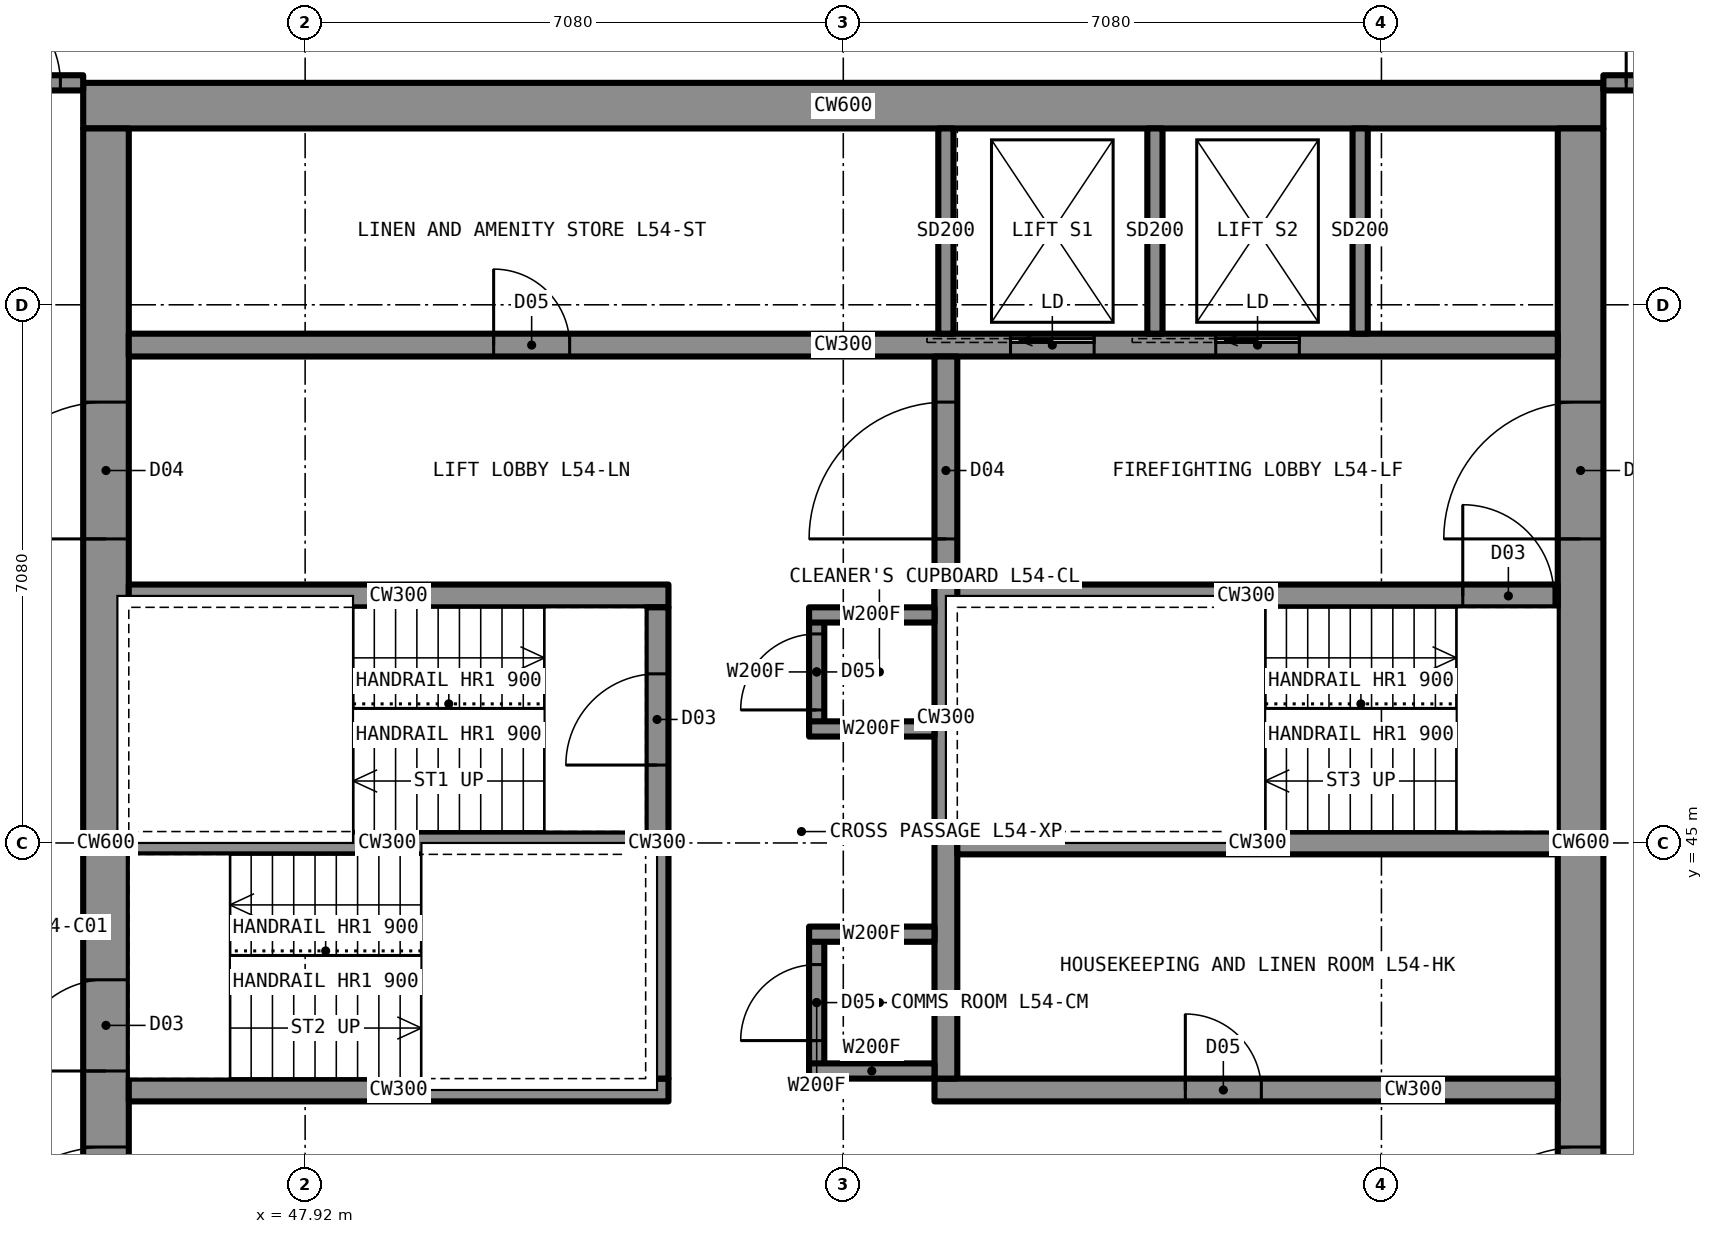
"""IFC4 building model, lengths in metres.
Left out: names, types, materials, properties, quantities, classifications, styles, units other than length and angle.
Written with IfcOpenShell. Run it as: python <this file> out.ifc"""

import sys

from ifc_helpers import new_model, si_unit, direction, frame, frame_2d, origin, place, context, subcontext, project, spatial, rectangle, extrude, element, fill, save


model = new_model("IFC4")
c1 = context("Model", 3, precision=1e-05, world=origin(), true_north=direction((0.0, 1.0)))
c2 = subcontext(c1, "Body", "Model", "MODEL_VIEW")
j1 = project(units=[si_unit("LENGTHUNIT", "METRE"), si_unit("PLANEANGLEUNIT", "RADIAN")], contexts=[c1])
p1 = place(None, origin())
s1 = spatial("IfcSite", under=j1, at=p1, CompositionType="ELEMENT")
p2 = place(p1, origin())
s2 = spatial("IfcBuilding", under=s1, at=p2, CompositionType="ELEMENT")
p3 = place(p2, frame((0.0, 0.0, 193.3)))
s3 = spatial("IfcBuildingStorey", under=s2, at=p3, CompositionType="ELEMENT", Elevation=193.3)
p4 = place(p3, frame((45.0, 54.7, 0.0), z_axis=(0.0, 0.0, 1.0), x_axis=(1.0, 0.0, 0.0)))
e1 = element("IfcWall", 1, at=p4, inside=s3, PredefinedType="SHEAR", context=c2, shape_type="SweptSolid", body=[
    extrude(rectangle(XDim=20.0, YDim=0.6, at=frame_2d((10.0, 0.0))), origin(), (0.0, 0.0, 1.0), 3.5),
])
p5 = place(p3, frame((64.7, 35.6, 0.0), z_axis=(0.0, 0.0, 1.0), x_axis=(0.0, 1.0, 0.0)))
e2 = element("IfcWall", 2, at=p5, inside=s3, PredefinedType="SHEAR", context=c2, shape_type="SweptSolid", body=[
    extrude(rectangle(XDim=18.8, YDim=0.6, at=frame_2d((9.4, 0.0))), origin(), (0.0, 0.0, 1.0), 3.5),
])
p6 = place(p5, frame((13.4, 0.0, 0.0)))
e3 = element("IfcOpeningElement", 3, at=p6, cuts=e2, PredefinedType="OPENING", context=c2, shape_type="SweptSolid", body=[
    extrude(rectangle(XDim=1.8, YDim=2.2, at=frame_2d((0.9, 1.1))), frame((0.0, 0.31, 0.0), z_axis=(0.0, -1.0, 0.0), x_axis=(1.0, 0.0, 0.0)), (0.0, 0.0, 1.0), 0.62),
])
p7 = place(p5, frame((3.6, 0.0, 0.0)))
e4 = element("IfcOpeningElement", 4, at=p7, cuts=e2, PredefinedType="OPENING", context=c2, shape_type="SweptSolid", body=[
    extrude(rectangle(XDim=1.8, YDim=2.2, at=frame_2d((0.9, 1.1))), frame((0.0, 0.31, 0.0), z_axis=(0.0, -1.0, 0.0), x_axis=(1.0, 0.0, 0.0)), (0.0, 0.0, 1.0), 0.62),
])
p8 = place(p3, frame((45.3, 35.6, 0.0), z_axis=(0.0, 0.0, 1.0), x_axis=(0.0, 1.0, 0.0)))
e5 = element("IfcWall", 5, at=p8, inside=s3, PredefinedType="SHEAR", context=c2, shape_type="SweptSolid", body=[
    extrude(rectangle(XDim=18.8, YDim=0.6, at=frame_2d((9.4, 0.0))), origin(), (0.0, 0.0, 1.0), 3.5),
])
p9 = place(p8, frame((13.4, 0.0, 0.0)))
e6 = element("IfcOpeningElement", 6, at=p9, cuts=e5, PredefinedType="OPENING", context=c2, shape_type="SweptSolid", body=[
    extrude(rectangle(XDim=1.8, YDim=2.2, at=frame_2d((0.9, 1.1))), frame((0.0, 0.31, 0.0), z_axis=(0.0, -1.0, 0.0), x_axis=(1.0, 0.0, 0.0)), (0.0, 0.0, 1.0), 0.62),
])
p10 = place(p8, frame((3.6, 0.0, 0.0)))
e7 = element("IfcOpeningElement", 7, at=p10, cuts=e5, PredefinedType="OPENING", context=c2, shape_type="SweptSolid", body=[
    extrude(rectangle(XDim=1.8, YDim=2.2, at=frame_2d((0.9, 1.1))), frame((0.0, 0.31, 0.0), z_axis=(0.0, -1.0, 0.0), x_axis=(1.0, 0.0, 0.0)), (0.0, 0.0, 1.0), 0.62),
])
p11 = place(p8, frame((6.4, 0.0, 0.0)))
e8 = element("IfcOpeningElement", 8, at=p11, cuts=e5, PredefinedType="OPENING", context=c2, shape_type="SweptSolid", body=[
    extrude(rectangle(XDim=1.2, YDim=2.2, at=frame_2d((0.6, 1.1))), frame((0.0, 0.31, 0.0), z_axis=(0.0, -1.0, 0.0), x_axis=(1.0, 0.0, 0.0)), (0.0, 0.0, 1.0), 0.62),
])
p12 = place(p3, frame((45.6, 51.55, 0.0), z_axis=(0.0, 0.0, 1.0), x_axis=(1.0, 0.0, 0.0)))
e9 = element("IfcWall", 9, at=p12, inside=s3, PredefinedType="SHEAR", context=c2, shape_type="SweptSolid", body=[
    extrude(rectangle(XDim=18.8, YDim=0.3, at=frame_2d((9.4, 0.0))), origin(), (0.0, 0.0, 1.0), 3.5),
])
p13 = place(p12, frame((4.8, 0.0, 0.0)))
e10 = element("IfcOpeningElement", 10, at=p13, cuts=e9, PredefinedType="OPENING", context=c2, shape_type="SweptSolid", body=[
    extrude(rectangle(XDim=1.0, YDim=2.1, at=frame_2d((0.5, 1.05))), frame((0.0, 0.16, 0.0), z_axis=(0.0, -1.0, 0.0), x_axis=(1.0, 0.0, 0.0)), (0.0, 0.0, 1.0), 0.32),
])
p14 = place(p12, frame((11.6, 0.0, 0.0)))
e11 = element("IfcOpeningElement", 11, at=p14, cuts=e9, PredefinedType="OPENING", context=c2, shape_type="SweptSolid", body=[
    extrude(rectangle(XDim=1.1, YDim=2.2, at=frame_2d((0.55, 1.1))), frame((0.0, 0.16, 0.0), z_axis=(0.0, -1.0, 0.0), x_axis=(1.0, 0.0, 0.0)), (0.0, 0.0, 1.0), 0.32),
])
p15 = place(p12, frame((14.3, 0.0, 0.0)))
e12 = element("IfcOpeningElement", 12, at=p15, cuts=e9, PredefinedType="OPENING", context=c2, shape_type="SweptSolid", body=[
    extrude(rectangle(XDim=1.1, YDim=2.2, at=frame_2d((0.55, 1.1))), frame((0.0, 0.16, 0.0), z_axis=(0.0, -1.0, 0.0), x_axis=(1.0, 0.0, 0.0)), (0.0, 0.0, 1.0), 0.32),
])
p16 = place(p3, frame((45.6, 48.25, 0.0), z_axis=(0.0, 0.0, 1.0), x_axis=(1.0, 0.0, 0.0)))
e13 = element("IfcWall", 13, at=p16, inside=s3, PredefinedType="SHEAR", context=c2, shape_type="SweptSolid", body=[
    extrude(rectangle(XDim=7.1, YDim=0.3, at=frame_2d((3.55, 0.0))), origin(), (0.0, 0.0, 1.0), 3.5),
])
p17 = place(p3, frame((56.2, 48.25, 0.0), z_axis=(0.0, 0.0, 1.0), x_axis=(1.0, 0.0, 0.0)))
e14 = element("IfcWall", 14, at=p17, inside=s3, PredefinedType="SHEAR", context=c2, shape_type="SweptSolid", body=[
    extrude(rectangle(XDim=8.2, YDim=0.3, at=frame_2d((4.1, 0.0))), origin(), (0.0, 0.0, 1.0), 3.5),
])
p18 = place(p17, frame((6.95, 0.0, 0.0)))
e15 = element("IfcOpeningElement", 15, at=p18, cuts=e14, PredefinedType="OPENING", context=c2, shape_type="SweptSolid", body=[
    extrude(rectangle(XDim=1.2, YDim=2.2, at=frame_2d((0.6, 1.1))), frame((0.0, 0.16, 0.0), z_axis=(0.0, -1.0, 0.0), x_axis=(1.0, 0.0, 0.0)), (0.0, 0.0, 1.0), 0.32),
])
p19 = place(p3, frame((45.6, 41.75, 0.0), z_axis=(0.0, 0.0, 1.0), x_axis=(1.0, 0.0, 0.0)))
e16 = element("IfcWall", 16, at=p19, inside=s3, PredefinedType="SHEAR", context=c2, shape_type="SweptSolid", body=[
    extrude(rectangle(XDim=7.1, YDim=0.3, at=frame_2d((3.55, 0.0))), origin(), (0.0, 0.0, 1.0), 3.5),
])
p20 = place(p3, frame((56.2, 41.75, 0.0), z_axis=(0.0, 0.0, 1.0), x_axis=(1.0, 0.0, 0.0)))
e17 = element("IfcWall", 17, at=p20, inside=s3, PredefinedType="SHEAR", context=c2, shape_type="SweptSolid", body=[
    extrude(rectangle(XDim=8.2, YDim=0.3, at=frame_2d((4.1, 0.0))), origin(), (0.0, 0.0, 1.0), 3.5),
])
p21 = place(p20, frame((3.3, 0.0, 0.0)))
e18 = element("IfcOpeningElement", 18, at=p21, cuts=e17, PredefinedType="OPENING", context=c2, shape_type="SweptSolid", body=[
    extrude(rectangle(XDim=1.0, YDim=2.1, at=frame_2d((0.5, 1.05))), frame((0.0, 0.16, 0.0), z_axis=(0.0, -1.0, 0.0), x_axis=(1.0, 0.0, 0.0)), (0.0, 0.0, 1.0), 0.32),
])
p22 = place(p3, frame((52.55, 41.9, 0.0), z_axis=(0.0, 0.0, 1.0), x_axis=(0.0, 1.0, 0.0)))
e19 = element("IfcWall", 19, at=p22, inside=s3, PredefinedType="SHEAR", context=c2, shape_type="SweptSolid", body=[
    extrude(rectangle(XDim=6.2, YDim=0.3, at=frame_2d((3.1, 0.0))), origin(), (0.0, 0.0, 1.0), 3.5),
])
p23 = place(p22, frame((4.125, 0.0, 0.0)))
e20 = element("IfcOpeningElement", 20, at=p23, cuts=e19, PredefinedType="OPENING", context=c2, shape_type="SweptSolid", body=[
    extrude(rectangle(XDim=1.2, YDim=2.2, at=frame_2d((0.6, 1.1))), frame((0.0, 0.16, 0.0), z_axis=(0.0, -1.0, 0.0), x_axis=(1.0, 0.0, 0.0)), (0.0, 0.0, 1.0), 0.32),
])
p24 = place(p3, frame((56.35, 41.9, 0.0), z_axis=(0.0, 0.0, 1.0), x_axis=(0.0, 1.0, 0.0)))
e21 = element("IfcWall", 21, at=p24, inside=s3, PredefinedType="SHEAR", context=c2, shape_type="SweptSolid", body=[
    extrude(rectangle(XDim=9.5, YDim=0.3, at=frame_2d((4.75, 0.0))), origin(), (0.0, 0.0, 1.0), 3.5),
])
p25 = place(p24, frame((7.1, 0.0, 0.0)))
e22 = element("IfcOpeningElement", 22, at=p25, cuts=e21, PredefinedType="OPENING", context=c2, shape_type="SweptSolid", body=[
    extrude(rectangle(XDim=1.8, YDim=2.2, at=frame_2d((0.9, 1.1))), frame((0.0, 0.16, 0.0), z_axis=(0.0, -1.0, 0.0), x_axis=(1.0, 0.0, 0.0)), (0.0, 0.0, 1.0), 0.32),
])
p26 = place(p3, frame((45.6, 45.0, 0.0), z_axis=(0.0, 0.0, 1.0), x_axis=(1.0, 0.0, 0.0)))
e23 = element("IfcWall", 23, at=p26, inside=s3, PredefinedType="SHEAR", context=c2, shape_type="SweptSolid", body=[
    extrude(rectangle(XDim=6.8, YDim=0.3, at=frame_2d((3.4, 0.0))), origin(), (0.0, 0.0, 1.0), 3.5),
])
p27 = place(p3, frame((56.5, 45.0, 0.0), z_axis=(0.0, 0.0, 1.0), x_axis=(1.0, 0.0, 0.0)))
e24 = element("IfcWall", 24, at=p27, inside=s3, PredefinedType="SHEAR", context=c2, shape_type="SweptSolid", body=[
    extrude(rectangle(XDim=7.9, YDim=0.3, at=frame_2d((3.95, 0.0))), origin(), (0.0, 0.0, 1.0), 3.5),
])
p28 = place(p3, frame((43.2, 55.0, 0.0), z_axis=(0.0, 0.0, 1.0), x_axis=(1.0, 0.0, 0.0)))
e25 = element("IfcWall", 25, at=p28, inside=s3, PredefinedType="PARTITIONING", context=c2, shape_type="SweptSolid", body=[
    extrude(rectangle(XDim=1.8, YDim=0.2, at=frame_2d((0.9, 0.0))), origin(), (0.0, 0.0, 1.0), 3.33),
])
p29 = place(p28, frame((0.3, 0.0, 0.0)))
e26 = element("IfcOpeningElement", 26, at=p29, cuts=e25, PredefinedType="OPENING", context=c2, shape_type="SweptSolid", body=[
    extrude(rectangle(XDim=1.2, YDim=2.2, at=frame_2d((0.6, 1.1))), frame((0.0, 0.11, 0.0), z_axis=(0.0, -1.0, 0.0), x_axis=(1.0, 0.0, 0.0)), (0.0, 0.0, 1.0), 0.22),
])
p30 = place(p3, frame((65.0, 55.0, 0.0), z_axis=(0.0, 0.0, 1.0), x_axis=(1.0, 0.0, 0.0)))
e27 = element("IfcWall", 27, at=p30, inside=s3, PredefinedType="PARTITIONING", context=c2, shape_type="SweptSolid", body=[
    extrude(rectangle(XDim=1.8, YDim=0.2, at=frame_2d((0.9, 0.0))), origin(), (0.0, 0.0, 1.0), 3.33),
])
p31 = place(p30, frame((0.3, 0.0, 0.0)))
e28 = element("IfcOpeningElement", 28, at=p31, cuts=e27, PredefinedType="OPENING", context=c2, shape_type="SweptSolid", body=[
    extrude(rectangle(XDim=1.2, YDim=2.2, at=frame_2d((0.6, 1.1))), frame((0.0, 0.11, 0.0), z_axis=(0.0, -1.0, 0.0), x_axis=(1.0, 0.0, 0.0)), (0.0, 0.0, 1.0), 0.22),
])
p32 = place(p3, frame((54.35, 42.0, 0.0), z_axis=(0.0, 0.0, 1.0), x_axis=(0.0, 1.0, 0.0)))
e29 = element("IfcWall", 29, at=p32, inside=s3, PredefinedType="PARTITIONING", context=c2, shape_type="SweptSolid", body=[
    extrude(rectangle(XDim=2.5, YDim=0.2, at=frame_2d((1.25, 0.0))), origin(), (0.0, 0.0, 1.0), 3.33),
])
p33 = place(p32, frame((0.75, 0.0, 0.0)))
e30 = element("IfcOpeningElement", 30, at=p33, cuts=e29, PredefinedType="OPENING", context=c2, shape_type="SweptSolid", body=[
    extrude(rectangle(XDim=1.0, YDim=2.1, at=frame_2d((0.5, 1.05))), frame((0.0, 0.11, 0.0), z_axis=(0.0, -1.0, 0.0), x_axis=(1.0, 0.0, 0.0)), (0.0, 0.0, 1.0), 0.22),
])
for number, where, z_axis, x_axis in (
    (31, (54.25, 42.0, 0.0), (0.0, 0.0, 1.0), (1.0, 0.0, 0.0)),
    (32, (54.25, 44.5, 0.0), (0.0, 0.0, 1.0), (1.0, 0.0, 0.0)),
):
    element("IfcWall", number, at=place(p3, frame(where, z_axis=z_axis, x_axis=x_axis)), inside=s3, PredefinedType="PARTITIONING", context=c2, shape_type="SweptSolid", body=[
        extrude(rectangle(XDim=1.95, YDim=0.2, at=frame_2d((0.975, 0.0))), origin(), (0.0, 0.0, 1.0), 3.33),
    ])
p34 = place(p3, frame((54.35, 44.9, 0.0), z_axis=(0.0, 0.0, 1.0), x_axis=(0.0, 1.0, 0.0)))
e33 = element("IfcWall", 33, at=p34, inside=s3, PredefinedType="PARTITIONING", context=c2, shape_type="SweptSolid", body=[
    extrude(rectangle(XDim=1.7, YDim=0.2, at=frame_2d((0.85, 0.0))), origin(), (0.0, 0.0, 1.0), 3.33),
])
p35 = place(p34, frame((0.35, 0.0, 0.0)))
e34 = element("IfcOpeningElement", 34, at=p35, cuts=e33, PredefinedType="OPENING", context=c2, shape_type="SweptSolid", body=[
    extrude(rectangle(XDim=1.0, YDim=2.1, at=frame_2d((0.5, 1.05))), frame((0.0, 0.11, 0.0), z_axis=(0.0, -1.0, 0.0), x_axis=(1.0, 0.0, 0.0)), (0.0, 0.0, 1.0), 0.22),
])
for number, where, z_axis, x_axis in (
    (35, (54.25, 44.9, 0.0), (0.0, 0.0, 1.0), (1.0, 0.0, 0.0)),
    (36, (54.25, 46.6, 0.0), (0.0, 0.0, 1.0), (1.0, 0.0, 0.0)),
):
    element("IfcWall", number, at=place(p3, frame(where, z_axis=z_axis, x_axis=x_axis)), inside=s3, PredefinedType="PARTITIONING", context=c2, shape_type="SweptSolid", body=[
        extrude(rectangle(XDim=1.95, YDim=0.2, at=frame_2d((0.975, 0.0))), origin(), (0.0, 0.0, 1.0), 3.33),
    ])
for number, where, z_axis, x_axis in (
    (37, (59.1, 51.7, 0.0), (0.0, 0.0, 1.0), (0.0, 1.0, 0.0)),
    (38, (61.8, 51.7, 0.0), (0.0, 0.0, 1.0), (0.0, 1.0, 0.0)),
    (39, (56.35, 51.7, 0.0), (0.0, 0.0, 1.0), (0.0, 1.0, 0.0)),
):
    element("IfcWall", number, at=place(p3, frame(where, z_axis=z_axis, x_axis=x_axis)), inside=s3, PredefinedType="PARTITIONING", context=c2, shape_type="SweptSolid", body=[
        extrude(rectangle(XDim=2.7, YDim=0.2, at=frame_2d((1.35, 0.0))), origin(), (0.0, 0.0, 1.0), 3.33),
    ])
p36 = place(p29, origin())
e40 = element("IfcDoor", 40, at=p36, inside=s3, OperationType="SINGLE_SWING_LEFT", PredefinedType="DOOR", context=c2, shape_type="SweptSolid", body=[
    extrude(rectangle(XDim=1.2, YDim=2.2, at=frame_2d((0.6, 1.1))), frame((0.0, 0.025, 0.0), z_axis=(0.0, -1.0, 0.0), x_axis=(1.0, 0.0, 0.0)), (0.0, 0.0, 1.0), 0.05),
])
fill(e26, e40)
p37 = place(p31, origin())
e41 = element("IfcDoor", 41, at=p37, inside=s3, OperationType="SINGLE_SWING_LEFT", PredefinedType="DOOR", context=c2, shape_type="SweptSolid", body=[
    extrude(rectangle(XDim=1.2, YDim=2.2, at=frame_2d((0.6, 1.1))), frame((0.0, 0.025, 0.0), z_axis=(0.0, -1.0, 0.0), x_axis=(1.0, 0.0, 0.0)), (0.0, 0.0, 1.0), 0.05),
])
fill(e28, e41)
p38 = place(p33, origin())
e42 = element("IfcDoor", 42, at=p38, inside=s3, OperationType="SINGLE_SWING_LEFT", PredefinedType="DOOR", context=c2, shape_type="SweptSolid", body=[
    extrude(rectangle(XDim=1.0, YDim=2.1, at=frame_2d((0.5, 1.05))), frame((0.0, 0.025, 0.0), z_axis=(0.0, -1.0, 0.0), x_axis=(1.0, 0.0, 0.0)), (0.0, 0.0, 1.0), 0.05),
])
fill(e30, e42)
p39 = place(p35, origin())
e43 = element("IfcDoor", 43, at=p39, inside=s3, OperationType="SINGLE_SWING_LEFT", PredefinedType="DOOR", context=c2, shape_type="SweptSolid", body=[
    extrude(rectangle(XDim=1.0, YDim=2.1, at=frame_2d((0.5, 1.05))), frame((0.0, 0.025, 0.0), z_axis=(0.0, -1.0, 0.0), x_axis=(1.0, 0.0, 0.0)), (0.0, 0.0, 1.0), 0.05),
])
fill(e34, e43)
p40 = place(p9, origin())
e44 = element("IfcDoor", 44, at=p40, inside=s3, OperationType="DOUBLE_DOOR_SINGLE_SWING", PredefinedType="DOOR", context=c2, shape_type="SweptSolid", body=[
    extrude(rectangle(XDim=1.8, YDim=2.2, at=frame_2d((0.9, 1.1))), frame((0.0, 0.025, 0.0), z_axis=(0.0, -1.0, 0.0), x_axis=(1.0, 0.0, 0.0)), (0.0, 0.0, 1.0), 0.05),
])
fill(e6, e44)
p41 = place(p10, origin())
e45 = element("IfcDoor", 45, at=p41, inside=s3, OperationType="DOUBLE_DOOR_SINGLE_SWING", PredefinedType="DOOR", context=c2, shape_type="SweptSolid", body=[
    extrude(rectangle(XDim=1.8, YDim=2.2, at=frame_2d((0.9, 1.1))), frame((0.0, 0.025, 0.0), z_axis=(0.0, -1.0, 0.0), x_axis=(1.0, 0.0, 0.0)), (0.0, 0.0, 1.0), 0.05),
])
fill(e7, e45)
p42 = place(p6, origin())
e46 = element("IfcDoor", 46, at=p42, inside=s3, OperationType="DOUBLE_DOOR_SINGLE_SWING", PredefinedType="DOOR", context=c2, shape_type="SweptSolid", body=[
    extrude(rectangle(XDim=1.8, YDim=2.2, at=frame_2d((0.9, 1.1))), frame((0.0, 0.025, 0.0), z_axis=(0.0, -1.0, 0.0), x_axis=(1.0, 0.0, 0.0)), (0.0, 0.0, 1.0), 0.05),
])
fill(e3, e46)
p43 = place(p7, origin())
e47 = element("IfcDoor", 47, at=p43, inside=s3, OperationType="DOUBLE_DOOR_SINGLE_SWING", PredefinedType="DOOR", context=c2, shape_type="SweptSolid", body=[
    extrude(rectangle(XDim=1.8, YDim=2.2, at=frame_2d((0.9, 1.1))), frame((0.0, 0.025, 0.0), z_axis=(0.0, -1.0, 0.0), x_axis=(1.0, 0.0, 0.0)), (0.0, 0.0, 1.0), 0.05),
])
fill(e4, e47)
p44 = place(p25, origin())
e48 = element("IfcDoor", 48, at=p44, inside=s3, OperationType="DOUBLE_DOOR_SINGLE_SWING", PredefinedType="DOOR", context=c2, shape_type="SweptSolid", body=[
    extrude(rectangle(XDim=1.8, YDim=2.2, at=frame_2d((0.9, 1.1))), frame((0.0, 0.025, 0.0), z_axis=(0.0, -1.0, 0.0), x_axis=(1.0, 0.0, 0.0)), (0.0, 0.0, 1.0), 0.05),
])
fill(e22, e48)
p45 = place(p23, origin())
e49 = element("IfcDoor", 49, at=p45, inside=s3, OperationType="SINGLE_SWING_LEFT", PredefinedType="DOOR", context=c2, shape_type="SweptSolid", body=[
    extrude(rectangle(XDim=1.2, YDim=2.2, at=frame_2d((0.6, 1.1))), frame((0.0, 0.025, 0.0), z_axis=(0.0, -1.0, 0.0), x_axis=(1.0, 0.0, 0.0)), (0.0, 0.0, 1.0), 0.05),
])
fill(e20, e49)
p46 = place(p11, origin())
e50 = element("IfcDoor", 50, at=p46, inside=s3, OperationType="SINGLE_SWING_LEFT", PredefinedType="DOOR", context=c2, shape_type="SweptSolid", body=[
    extrude(rectangle(XDim=1.2, YDim=2.2, at=frame_2d((0.6, 1.1))), frame((0.0, 0.025, 0.0), z_axis=(0.0, -1.0, 0.0), x_axis=(1.0, 0.0, 0.0)), (0.0, 0.0, 1.0), 0.05),
])
fill(e8, e50)
p47 = place(p18, origin())
e51 = element("IfcDoor", 51, at=p47, inside=s3, OperationType="SINGLE_SWING_LEFT", PredefinedType="DOOR", context=c2, shape_type="SweptSolid", body=[
    extrude(rectangle(XDim=1.2, YDim=2.2, at=frame_2d((0.6, 1.1))), frame((0.0, 0.025, 0.0), z_axis=(0.0, -1.0, 0.0), x_axis=(1.0, 0.0, 0.0)), (0.0, 0.0, 1.0), 0.05),
])
fill(e15, e51)
p48 = place(p21, origin())
e52 = element("IfcDoor", 52, at=p48, inside=s3, OperationType="SINGLE_SWING_LEFT", PredefinedType="DOOR", context=c2, shape_type="SweptSolid", body=[
    extrude(rectangle(XDim=1.0, YDim=2.1, at=frame_2d((0.5, 1.05))), frame((0.0, 0.025, 0.0), z_axis=(0.0, -1.0, 0.0), x_axis=(1.0, 0.0, 0.0)), (0.0, 0.0, 1.0), 0.05),
])
fill(e18, e52)
p49 = place(p13, origin())
e53 = element("IfcDoor", 53, at=p49, inside=s3, OperationType="SINGLE_SWING_LEFT", PredefinedType="DOOR", context=c2, shape_type="SweptSolid", body=[
    extrude(rectangle(XDim=1.0, YDim=2.1, at=frame_2d((0.5, 1.05))), frame((0.0, 0.025, 0.0), z_axis=(0.0, -1.0, 0.0), x_axis=(1.0, 0.0, 0.0)), (0.0, 0.0, 1.0), 0.05),
])
fill(e10, e53)
p50 = place(p14, origin())
e54 = element("IfcDoor", 54, at=p50, inside=s3, OperationType="SLIDING_TO_LEFT", PredefinedType="DOOR", context=c2, shape_type="SweptSolid", body=[
    extrude(rectangle(XDim=1.1, YDim=2.2, at=frame_2d((0.55, 1.1))), frame((0.0, 0.025, 0.0), z_axis=(0.0, -1.0, 0.0), x_axis=(1.0, 0.0, 0.0)), (0.0, 0.0, 1.0), 0.05),
])
fill(e11, e54)
p51 = place(p15, origin())
e55 = element("IfcDoor", 55, at=p51, inside=s3, OperationType="SLIDING_TO_LEFT", PredefinedType="DOOR", context=c2, shape_type="SweptSolid", body=[
    extrude(rectangle(XDim=1.1, YDim=2.2, at=frame_2d((0.55, 1.1))), frame((0.0, 0.025, 0.0), z_axis=(0.0, -1.0, 0.0), x_axis=(1.0, 0.0, 0.0)), (0.0, 0.0, 1.0), 0.05),
])
fill(e12, e55)
save(model, sys.argv[1])
